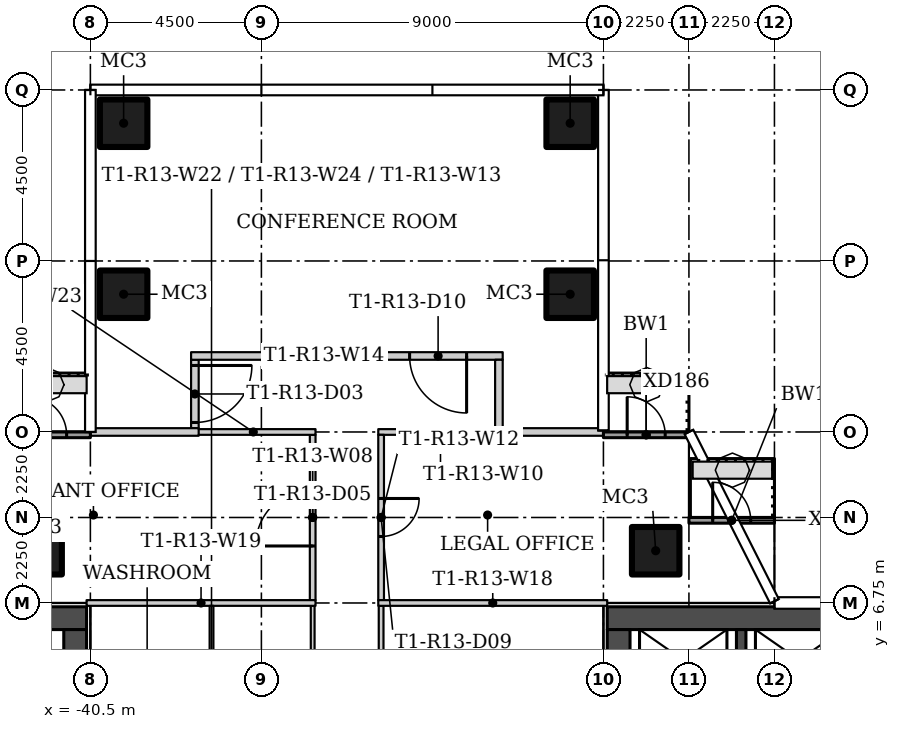
"""IFC4 building model, lengths in metres.
Left out: names, types, materials, properties, quantities, classifications, styles, units other than length and angle.
Written with IfcOpenShell. Run it as: python <this file> out.ifc"""

import sys

from ifc_helpers import new_model, si_unit, direction, frame, frame_2d, origin, origin_2d, place, context, subcontext, project, spatial, rectangle, hollow_rectangle, extrude, element, fill, save


model = new_model("IFC4")
c1 = context("Model", 3, precision=1e-05, world=origin(), true_north=direction((0.0, 1.0)))
c2 = subcontext(c1, "Body", "Model", "MODEL_VIEW")
j1 = project(units=[si_unit("LENGTHUNIT", "METRE"), si_unit("PLANEANGLEUNIT", "RADIAN")], contexts=[c1])
p1 = place(None, origin())
s1 = spatial("IfcSite", under=j1, at=p1, CompositionType="ELEMENT")
p2 = place(p1, origin())
s2 = spatial("IfcBuilding", under=s1, at=p2, CompositionType="ELEMENT")
p3 = place(p2, frame((0.0, 0.0, 124.8)))
s3 = spatial("IfcBuildingStorey", under=s2, at=p3, CompositionType="ELEMENT", Elevation=124.8)
for number, where in (
    (1, (-25.625, 8.125, 0.0)),
    (2, (-41.875, 8.125, 0.0)),
    (3, (-39.625, 14.875, 0.0)),
    (4, (-39.625, 19.375, 0.0)),
    (5, (-27.875, 14.875, 0.0)),
    (6, (-27.875, 19.375, 0.0)),
):
    element("IfcColumn", number, at=place(p3, frame(where)), inside=s3, PredefinedType="COLUMN", context=c2, shape_type="SweptSolid", body=[
        extrude(hollow_rectangle(XDim=1.25, YDim=1.25, WallThickness=0.05, at=origin_2d()), origin(), (0.0, 0.0, 1.0), 3.45),
    ])
p4 = place(p3, frame((-32.85, 6.675, 0.0), z_axis=(0.0, 0.0, 1.0), x_axis=(0.0, -1.0, 0.0)))
e7 = element("IfcWall", 7, at=p4, inside=s3, PredefinedType="PARTITIONING", context=c2, shape_type="SweptSolid", body=[
    extrude(rectangle(XDim=4.162, YDim=0.125, at=frame_2d((2.081, 0.0))), origin(), (0.0, 0.0, 1.0), 3.45),
])
p5 = place(p3, frame((-34.65, 2.5, 0.0), z_axis=(0.0, 0.0, 1.0), x_axis=(0.0, 1.0, 0.0)))
e8 = element("IfcWall", 8, at=p5, inside=s3, PredefinedType="PARTITIONING", context=c2, shape_type="SweptSolid", body=[
    extrude(rectangle(XDim=4.175, YDim=0.1, at=frame_2d((2.087, 0.0))), origin(), (0.0, 0.0, 1.0), 3.45),
])
p6 = place(p3, frame((-34.65, 6.825, 0.0), z_axis=(0.0, 0.0, 1.0), x_axis=(0.0, 1.0, 0.0)))
e9 = element("IfcWall", 9, at=p6, inside=s3, PredefinedType="PARTITIONING", context=c2, shape_type="SweptSolid", body=[
    extrude(rectangle(XDim=4.35, YDim=0.15, at=frame_2d((2.175, 0.0))), origin(), (0.0, 0.0, 1.0), 3.45),
])
p7 = place(p6, frame((1.425, 0.0, 0.0)))
e10 = element("IfcOpeningElement", 10, at=p7, cuts=e9, PredefinedType="OPENING", context=c2, shape_type="SweptSolid", body=[
    extrude(rectangle(XDim=1.5, YDim=2.1, at=frame_2d((0.75, 1.05))), frame((0.0, 0.085, 0.0), z_axis=(0.0, -1.0, 0.0), x_axis=(1.0, 0.0, 0.0)), (0.0, 0.0, 1.0), 0.17),
])
for number, where, z_axis, x_axis in (
    (11, (-29.65, 11.25, 0.0), (0.0, 0.0, 1.0), (-1.0, 0.0, 0.0)),
    (12, (-34.575, 11.25, 0.0), (0.0, 0.0, 1.0), (-1.0, 0.0, 0.0)),
):
    element("IfcWall", number, at=place(p3, frame(where, z_axis=z_axis, x_axis=x_axis)), inside=s3, PredefinedType="PARTITIONING", context=c2, shape_type="SweptSolid", body=[
        extrude(rectangle(XDim=3.275, YDim=0.15, at=frame_2d((1.637, 0.0))), origin(), (0.0, 0.0, 1.0), 3.45),
    ])
p8 = place(p3, frame((-32.85, 11.175, 0.0), z_axis=(0.0, 0.0, 1.0), x_axis=(0.0, -1.0, 0.0)))
e13 = element("IfcWall", 13, at=p8, inside=s3, PredefinedType="PARTITIONING", context=c2, shape_type="SweptSolid", body=[
    extrude(rectangle(XDim=4.35, YDim=0.15, at=frame_2d((2.175, 0.0))), origin(), (0.0, 0.0, 1.0), 3.45),
])
p9 = place(p8, frame((1.675, 0.0, 0.0)))
e14 = element("IfcOpeningElement", 14, at=p9, cuts=e13, PredefinedType="OPENING", context=c2, shape_type="SweptSolid", body=[
    extrude(rectangle(XDim=1.0, YDim=2.4, at=frame_2d((0.5, 1.2))), frame((0.0, 0.085, 0.0), z_axis=(0.0, -1.0, 0.0), x_axis=(1.0, 0.0, 0.0)), (0.0, 0.0, 1.0), 0.17),
])
p10 = place(p3, frame((-37.75, 13.15, 0.0), z_axis=(0.0, 0.0, 1.0), x_axis=(0.0, -1.0, 0.0)))
e15 = element("IfcWall", 15, at=p10, inside=s3, PredefinedType="PARTITIONING", context=c2, shape_type="SweptSolid", body=[
    extrude(rectangle(XDim=1.8, YDim=0.2, at=frame_2d((0.9, 0.0))), origin(), (0.0, 0.0, 1.0), 3.45),
])
p11 = place(p10, frame((0.15, 0.0, 0.0)))
e16 = element("IfcOpeningElement", 16, at=p11, cuts=e15, PredefinedType="OPENING", context=c2, shape_type="SweptSolid", body=[
    extrude(rectangle(XDim=1.5, YDim=2.4, at=frame_2d((0.75, 1.2))), frame((0.0, 0.11, 0.0), z_axis=(0.0, -1.0, 0.0), x_axis=(1.0, 0.0, 0.0)), (0.0, 0.0, 1.0), 0.22),
])
p12 = place(p3, frame((-29.65, 13.25, 0.0), z_axis=(0.0, 0.0, 1.0), x_axis=(-1.0, 0.0, 0.0)))
e17 = element("IfcWall", 17, at=p12, inside=s3, PredefinedType="PARTITIONING", context=c2, shape_type="SweptSolid", body=[
    extrude(rectangle(XDim=8.2, YDim=0.2, at=frame_2d((4.1, 0.0))), origin(), (0.0, 0.0, 1.0), 3.45),
])
p13 = place(p12, frame((0.95, 0.0, 0.0)))
e18 = element("IfcOpeningElement", 18, at=p13, cuts=e17, PredefinedType="OPENING", context=c2, shape_type="SweptSolid", body=[
    extrude(rectangle(XDim=1.5, YDim=2.4, at=frame_2d((0.75, 1.2))), frame((0.0, 0.11, 0.0), z_axis=(0.0, -1.0, 0.0), x_axis=(1.0, 0.0, 0.0)), (0.0, 0.0, 1.0), 0.22),
])
p14 = place(p3, frame((-29.75, 11.35, 0.0), z_axis=(0.0, 0.0, 1.0), x_axis=(0.0, 1.0, 0.0)))
e19 = element("IfcWall", 19, at=p14, inside=s3, PredefinedType="PARTITIONING", context=c2, shape_type="SweptSolid", body=[
    extrude(rectangle(XDim=1.8, YDim=0.2, at=frame_2d((0.9, 0.0))), origin(), (0.0, 0.0, 1.0), 3.45),
])
for number, where, z_axis, x_axis in (
    (20, (-26.9, 6.75, 0.0), (0.0, 0.0, 1.0), (-1.0, 0.0, 0.0)),
    (21, (-34.575, 6.75, 0.0), (0.0, 0.0, 1.0), (-1.0, 0.0, 0.0)),
):
    element("IfcWall", number, at=place(p3, frame(where, z_axis=z_axis, x_axis=x_axis)), inside=s3, PredefinedType="PARTITIONING", context=c2, shape_type="SweptSolid", body=[
        extrude(rectangle(XDim=6.025, YDim=0.15, at=frame_2d((3.012, 0.0))), origin(), (0.0, 0.0, 1.0), 3.45),
    ])
p15 = place(p3, frame((-37.312, 2.5, 0.0), z_axis=(0.0, 0.0, 1.0), x_axis=(0.0, 1.0, 0.0)))
e22 = element("IfcWall", 22, at=p15, inside=s3, PredefinedType="PARTITIONING", context=c2, shape_type="SweptSolid", body=[
    extrude(rectangle(XDim=4.175, YDim=0.1, at=frame_2d((2.087, 0.0))), origin(), (0.0, 0.0, 1.0), 3.45),
])
for number, where, z_axis, x_axis in (
    (23, (-27.0, 11.25, 0.0), (0.0, 0.0, 1.0), (-1.0, 0.0, 0.0)),
    (24, (-37.65, 11.25, 0.0), (0.0, 0.0, 1.0), (-1.0, 0.0, 0.0)),
):
    element("IfcWall", number, at=place(p3, frame(where, z_axis=z_axis, x_axis=x_axis)), inside=s3, PredefinedType="PARTITIONING", context=c2, shape_type="SweptSolid", body=[
        extrude(rectangle(XDim=2.85, YDim=0.2, at=frame_2d((1.425, 0.0))), origin(), (0.0, 0.0, 1.0), 3.45),
    ])
p16 = place(p3, frame((-24.75, 8.925, 0.0)))
e25 = element("IfcWall", 25, at=p16, inside=s3, PredefinedType="SOLIDWALL", context=c2, shape_type="SweptSolid", body=[
    extrude(rectangle(XDim=2.25, YDim=0.15, at=frame_2d((1.125, 0.0))), origin(), (0.0, 0.0, 1.0), 3.45),
])
p17 = place(p16, frame((0.625, 0.0, 0.0)))
e26 = element("IfcOpeningElement", 26, at=p17, cuts=e25, PredefinedType="OPENING", context=c2, shape_type="SweptSolid", body=[
    extrude(rectangle(XDim=1.0, YDim=2.4, at=frame_2d((0.5, 1.2))), frame((0.0, 0.085, 0.0), z_axis=(0.0, -1.0, 0.0), x_axis=(1.0, 0.0, 0.0)), (0.0, 0.0, 1.0), 0.17),
])
p18 = place(p3, frame((-27.0, 11.175, 0.0)))
e27 = element("IfcWall", 27, at=p18, inside=s3, PredefinedType="SOLIDWALL", context=c2, shape_type="SweptSolid", body=[
    extrude(rectangle(XDim=2.25, YDim=0.15, at=frame_2d((1.125, 0.0))), origin(), (0.0, 0.0, 1.0), 3.45),
])
p19 = place(p18, frame((0.625, 0.0, 0.0)))
e28 = element("IfcOpeningElement", 28, at=p19, cuts=e27, PredefinedType="OPENING", context=c2, shape_type="SweptSolid", body=[
    extrude(rectangle(XDim=1.0, YDim=2.4, at=frame_2d((0.5, 1.2))), frame((0.0, 0.085, 0.0), z_axis=(0.0, -1.0, 0.0), x_axis=(1.0, 0.0, 0.0)), (0.0, 0.0, 1.0), 0.17),
])
p20 = place(p3, frame((-42.75, 11.175, 0.0)))
e29 = element("IfcWall", 29, at=p20, inside=s3, PredefinedType="SOLIDWALL", context=c2, shape_type="SweptSolid", body=[
    extrude(rectangle(XDim=2.25, YDim=0.15, at=frame_2d((1.125, 0.0))), origin(), (0.0, 0.0, 1.0), 3.45),
])
p21 = place(p20, frame((0.625, 0.0, 0.0)))
e30 = element("IfcOpeningElement", 30, at=p21, cuts=e29, PredefinedType="OPENING", context=c2, shape_type="SweptSolid", body=[
    extrude(rectangle(XDim=1.0, YDim=2.4, at=frame_2d((0.5, 1.2))), frame((0.0, 0.085, 0.0), z_axis=(0.0, -1.0, 0.0), x_axis=(1.0, 0.0, 0.0)), (0.0, 0.0, 1.0), 0.17),
])
p22 = place(p3, frame((-26.9, 6.35, 0.0)))
e31 = element("IfcWall", 31, at=p22, inside=s3, PredefinedType="SHEAR", context=c2, shape_type="SweptSolid", body=[
    extrude(rectangle(XDim=13.3, YDim=0.6, at=frame_2d((6.65, 0.0))), origin(), (0.0, 0.0, 1.0), 3.45),
])
p23 = place(p3, frame((-26.6, 6.05, 0.0), z_axis=(0.0, 0.0, 1.0), x_axis=(0.0, -1.0, 0.0)))
e32 = element("IfcWall", 32, at=p23, inside=s3, PredefinedType="SHEAR", context=c2, shape_type="SweptSolid", body=[
    extrude(rectangle(XDim=12.1, YDim=0.6, at=frame_2d((6.05, 0.0))), origin(), (0.0, 0.0, 1.0), 3.45),
])
p24 = place(p23, frame((3.9, 0.0, 0.0)))
e33 = element("IfcOpeningElement", 33, at=p24, cuts=e32, PredefinedType="OPENING", context=c2, shape_type="SweptSolid", body=[
    extrude(rectangle(XDim=1.8, YDim=2.4, at=frame_2d((0.9, 1.2))), frame((0.0, 0.31, 0.0), z_axis=(0.0, -1.0, 0.0), x_axis=(1.0, 0.0, 0.0)), (0.0, 0.0, 1.0), 0.62),
])
p25 = place(p3, frame((-23.375, 3.25, 0.0), z_axis=(0.0, 0.0, 1.0), x_axis=(0.0, 1.0, 0.0)))
e34 = element("IfcWall", 34, at=p25, inside=s3, PredefinedType="SHEAR", context=c2, shape_type="SweptSolid", body=[
    extrude(rectangle(XDim=2.8, YDim=0.25, at=frame_2d((1.4, 0.0))), origin(), (0.0, 0.0, 1.0), 3.45),
])
p26 = place(p3, frame((-40.6, 6.35, 0.0), z_axis=(0.0, 0.0, 1.0), x_axis=(-1.0, 0.0, 0.0)))
e35 = element("IfcWall", 35, at=p26, inside=s3, PredefinedType="SHEAR", context=c2, shape_type="SweptSolid", body=[
    extrude(rectangle(XDim=13.3, YDim=0.6, at=frame_2d((6.65, 0.0))), origin(), (0.0, 0.0, 1.0), 3.45),
])
p27 = place(p3, frame((-40.9, -6.05, 0.0), z_axis=(0.0, 0.0, 1.0), x_axis=(0.0, 1.0, 0.0)))
e36 = element("IfcWall", 36, at=p27, inside=s3, PredefinedType="SHEAR", context=c2, shape_type="SweptSolid", body=[
    extrude(rectangle(XDim=12.1, YDim=0.6, at=frame_2d((6.05, 0.0))), origin(), (0.0, 0.0, 1.0), 3.45),
])
p28 = place(p27, frame((6.4, 0.0, 0.0)))
e37 = element("IfcOpeningElement", 37, at=p28, cuts=e36, PredefinedType="OPENING", context=c2, shape_type="SweptSolid", body=[
    extrude(rectangle(XDim=1.8, YDim=2.4, at=frame_2d((0.9, 1.2))), frame((0.0, 0.31, 0.0), z_axis=(0.0, -1.0, 0.0), x_axis=(1.0, 0.0, 0.0)), (0.0, 0.0, 1.0), 0.62),
])
p29 = place(p11, origin())
e38 = element("IfcDoor", 38, at=p29, inside=s3, OperationType="DOUBLE_DOOR_SINGLE_SWING", PredefinedType="DOOR", context=c2, shape_type="SweptSolid", body=[
    extrude(rectangle(XDim=1.5, YDim=2.4, at=frame_2d((0.75, 1.2))), frame((0.0, 0.025, 0.0), z_axis=(0.0, -1.0, 0.0), x_axis=(1.0, 0.0, 0.0)), (0.0, 0.0, 1.0), 0.05),
])
fill(e16, e38)
p30 = place(p7, origin())
e39 = element("IfcDoor", 39, at=p30, inside=s3, OperationType="DOUBLE_DOOR_SINGLE_SWING", PredefinedType="DOOR", context=c2, shape_type="SweptSolid", body=[
    extrude(rectangle(XDim=1.5, YDim=2.1, at=frame_2d((0.75, 1.05))), frame((0.0, 0.025, 0.0), z_axis=(0.0, -1.0, 0.0), x_axis=(1.0, 0.0, 0.0)), (0.0, 0.0, 1.0), 0.05),
])
fill(e10, e39)
p31 = place(p9, origin())
e40 = element("IfcDoor", 40, at=p31, inside=s3, OperationType="SINGLE_SWING_LEFT", PredefinedType="DOOR", context=c2, shape_type="SweptSolid", body=[
    extrude(rectangle(XDim=1.0, YDim=2.4, at=frame_2d((0.5, 1.2))), frame((0.0, 0.025, 0.0), z_axis=(0.0, -1.0, 0.0), x_axis=(1.0, 0.0, 0.0)), (0.0, 0.0, 1.0), 0.05),
])
fill(e14, e40)
p32 = place(p13, origin())
e41 = element("IfcDoor", 41, at=p32, inside=s3, OperationType="DOUBLE_DOOR_SINGLE_SWING", PredefinedType="DOOR", context=c2, shape_type="SweptSolid", body=[
    extrude(rectangle(XDim=1.5, YDim=2.4, at=frame_2d((0.75, 1.2))), frame((0.0, 0.025, 0.0), z_axis=(0.0, -1.0, 0.0), x_axis=(1.0, 0.0, 0.0)), (0.0, 0.0, 1.0), 0.05),
])
fill(e18, e41)
p33 = place(p17, origin())
e42 = element("IfcDoor", 42, at=p33, inside=s3, OperationType="SINGLE_SWING_RIGHT", PredefinedType="DOOR", context=c2, shape_type="SweptSolid", body=[
    extrude(rectangle(XDim=1.0, YDim=2.4, at=frame_2d((0.5, 1.2))), frame((0.0, 0.025, 0.0), z_axis=(0.0, -1.0, 0.0), x_axis=(1.0, 0.0, 0.0)), (0.0, 0.0, 1.0), 0.05),
])
fill(e26, e42)
p34 = place(p19, origin())
e43 = element("IfcDoor", 43, at=p34, inside=s3, OperationType="SINGLE_SWING_LEFT", PredefinedType="DOOR", context=c2, shape_type="SweptSolid", body=[
    extrude(rectangle(XDim=1.0, YDim=2.4, at=frame_2d((0.5, 1.2))), frame((0.0, 0.025, 0.0), z_axis=(0.0, -1.0, 0.0), x_axis=(1.0, 0.0, 0.0)), (0.0, 0.0, 1.0), 0.05),
])
fill(e28, e43)
p35 = place(p21, origin())
e44 = element("IfcDoor", 44, at=p35, inside=s3, OperationType="SINGLE_SWING_LEFT", PredefinedType="DOOR", context=c2, shape_type="SweptSolid", body=[
    extrude(rectangle(XDim=1.0, YDim=2.4, at=frame_2d((0.5, 1.2))), frame((0.0, 0.025, 0.0), z_axis=(0.0, -1.0, 0.0), x_axis=(1.0, 0.0, 0.0)), (0.0, 0.0, 1.0), 0.05),
])
fill(e30, e44)
save(model, sys.argv[1])
